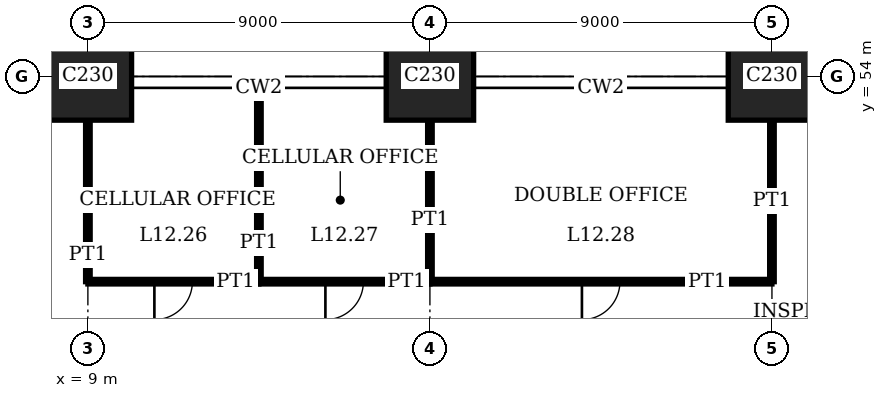
"""IFC4 building model, lengths in metres.
Left out: names, types, materials, properties, quantities, classifications, styles, units other than length and angle.
Written with IfcOpenShell. Run it as: python <this file> out.ifc"""

import sys

from ifc_helpers import new_model, si_unit, direction, frame, frame_2d, origin, origin_2d, place, context, subcontext, project, spatial, rectangle, extrude, element, fill, save


model = new_model("IFC4")
c1 = context("Model", 3, precision=1e-05, world=origin(), true_north=direction((0.0, 1.0)))
c2 = subcontext(c1, "Body", "Model", "MODEL_VIEW")
j1 = project(units=[si_unit("LENGTHUNIT", "METRE"), si_unit("PLANEANGLEUNIT", "RADIAN")], contexts=[c1])
p1 = place(None, origin())
s1 = spatial("IfcSite", under=j1, at=p1, CompositionType="ELEMENT")
p2 = place(p1, origin())
s2 = spatial("IfcBuilding", under=s1, at=p2, CompositionType="ELEMENT")
p3 = place(p2, frame((0.0, 0.0, 51.8)))
s3 = spatial("IfcBuildingStorey", under=s2, at=p3, CompositionType="ELEMENT", Elevation=51.8)
for number, where, z_axis, x_axis in (
    (1, (9.0, 54.0, 0.0), (0.0, 0.0, 1.0), (1.0, 0.0, 0.0)),
    (2, (18.0, 54.0, 0.0), (0.0, 0.0, 1.0), (1.0, 0.0, 0.0)),
    (3, (27.0, 54.0, 0.0), (0.0, 0.0, 1.0), (1.0, 0.0, 0.0)),
):
    element("IfcColumn", number, at=place(p3, frame(where, z_axis=z_axis, x_axis=x_axis)), inside=s3, PredefinedType="COLUMN", context=c2, shape_type="SweptSolid", body=[
        extrude(rectangle(XDim=2.3, YDim=2.3, at=origin_2d()), origin(), (0.0, 0.0, 1.0), 4.0),
    ])
p4 = place(p3, frame((9.0, 48.6, 0.0), z_axis=(0.0, 0.0, 1.0), x_axis=(1.0, 0.0, 0.0)))
e4 = element("IfcWall", 4, at=p4, inside=s3, PredefinedType="PARTITIONING", context=c2, shape_type="SweptSolid", body=[
    extrude(rectangle(XDim=4.5, YDim=0.12, at=frame_2d((2.25, 0.0))), origin(), (0.0, 0.0, 1.0), 3.75),
])
p5 = place(p4, frame((1.75, 0.0, 0.0)))
e5 = element("IfcOpeningElement", 5, at=p5, cuts=e4, PredefinedType="OPENING", context=c2, shape_type="SweptSolid", body=[
    extrude(rectangle(XDim=1.0, YDim=2.4, at=frame_2d((0.5, 1.2))), frame((0.0, 0.07, 0.0), z_axis=(0.0, -1.0, 0.0), x_axis=(1.0, 0.0, 0.0)), (0.0, 0.0, 1.0), 0.14),
])
p6 = place(p3, frame((13.5, 48.6, 0.0), z_axis=(0.0, 0.0, 1.0), x_axis=(1.0, 0.0, 0.0)))
e6 = element("IfcWall", 6, at=p6, inside=s3, PredefinedType="PARTITIONING", context=c2, shape_type="SweptSolid", body=[
    extrude(rectangle(XDim=4.5, YDim=0.12, at=frame_2d((2.25, 0.0))), origin(), (0.0, 0.0, 1.0), 3.75),
])
p7 = place(p6, frame((1.75, 0.0, 0.0)))
e7 = element("IfcOpeningElement", 7, at=p7, cuts=e6, PredefinedType="OPENING", context=c2, shape_type="SweptSolid", body=[
    extrude(rectangle(XDim=1.0, YDim=2.4, at=frame_2d((0.5, 1.2))), frame((0.0, 0.07, 0.0), z_axis=(0.0, -1.0, 0.0), x_axis=(1.0, 0.0, 0.0)), (0.0, 0.0, 1.0), 0.14),
])
p8 = place(p3, frame((18.0, 48.6, 0.0), z_axis=(0.0, 0.0, 1.0), x_axis=(1.0, 0.0, 0.0)))
e8 = element("IfcWall", 8, at=p8, inside=s3, PredefinedType="PARTITIONING", context=c2, shape_type="SweptSolid", body=[
    extrude(rectangle(XDim=9.0, YDim=0.12, at=frame_2d((4.5, 0.0))), origin(), (0.0, 0.0, 1.0), 3.75),
])
p9 = place(p8, frame((4.0, 0.0, 0.0)))
e9 = element("IfcOpeningElement", 9, at=p9, cuts=e8, PredefinedType="OPENING", context=c2, shape_type="SweptSolid", body=[
    extrude(rectangle(XDim=1.0, YDim=2.4, at=frame_2d((0.5, 1.2))), frame((0.0, 0.07, 0.0), z_axis=(0.0, -1.0, 0.0), x_axis=(1.0, 0.0, 0.0)), (0.0, 0.0, 1.0), 0.14),
])
p10 = place(p3, frame((9.0, 48.6, 0.0), z_axis=(0.0, 0.0, 1.0), x_axis=(0.0, 1.0, 0.0)))
e10 = element("IfcWall", 10, at=p10, inside=s3, PredefinedType="PARTITIONING", context=c2, shape_type="SweptSolid", body=[
    extrude(rectangle(XDim=4.25, YDim=0.12, at=frame_2d((2.125, 0.0))), origin(), (0.0, 0.0, 1.0), 3.05),
])
p11 = place(p3, frame((13.5, 48.6, 0.0), z_axis=(0.0, 0.0, 1.0), x_axis=(0.0, 1.0, 0.0)))
e11 = element("IfcWall", 11, at=p11, inside=s3, PredefinedType="PARTITIONING", context=c2, shape_type="SweptSolid", body=[
    extrude(rectangle(XDim=5.09, YDim=0.12, at=frame_2d((2.545, 0.0))), origin(), (0.0, 0.0, 1.0), 3.75),
])
for number, where, z_axis, x_axis in (
    (12, (18.0, 48.6, 0.0), (0.0, 0.0, 1.0), (0.0, 1.0, 0.0)),
    (13, (27.0, 48.6, 0.0), (0.0, 0.0, 1.0), (0.0, 1.0, 0.0)),
):
    element("IfcWall", number, at=place(p3, frame(where, z_axis=z_axis, x_axis=x_axis)), inside=s3, PredefinedType="PARTITIONING", context=c2, shape_type="SweptSolid", body=[
        extrude(rectangle(XDim=4.25, YDim=0.12, at=frame_2d((2.125, 0.0))), origin(), (0.0, 0.0, 1.0), 3.05),
    ])
p12 = place(p5, origin())
e14 = element("IfcDoor", 14, at=p12, inside=s3, OperationType="SINGLE_SWING_LEFT", PredefinedType="DOOR", context=c2, shape_type="SweptSolid", body=[
    extrude(rectangle(XDim=1.0, YDim=2.4, at=frame_2d((0.5, 1.2))), frame((0.0, 0.025, 0.0), z_axis=(0.0, -1.0, 0.0), x_axis=(1.0, 0.0, 0.0)), (0.0, 0.0, 1.0), 0.05),
])
fill(e5, e14)
p13 = place(p7, origin())
e15 = element("IfcDoor", 15, at=p13, inside=s3, OperationType="SINGLE_SWING_LEFT", PredefinedType="DOOR", context=c2, shape_type="SweptSolid", body=[
    extrude(rectangle(XDim=1.0, YDim=2.4, at=frame_2d((0.5, 1.2))), frame((0.0, 0.025, 0.0), z_axis=(0.0, -1.0, 0.0), x_axis=(1.0, 0.0, 0.0)), (0.0, 0.0, 1.0), 0.05),
])
fill(e7, e15)
p14 = place(p9, origin())
e16 = element("IfcDoor", 16, at=p14, inside=s3, OperationType="SINGLE_SWING_LEFT", PredefinedType="DOOR", context=c2, shape_type="SweptSolid", body=[
    extrude(rectangle(XDim=1.0, YDim=2.4, at=frame_2d((0.5, 1.2))), frame((0.0, 0.025, 0.0), z_axis=(0.0, -1.0, 0.0), x_axis=(1.0, 0.0, 0.0)), (0.0, 0.0, 1.0), 0.05),
])
fill(e9, e16)
save(model, sys.argv[1])
